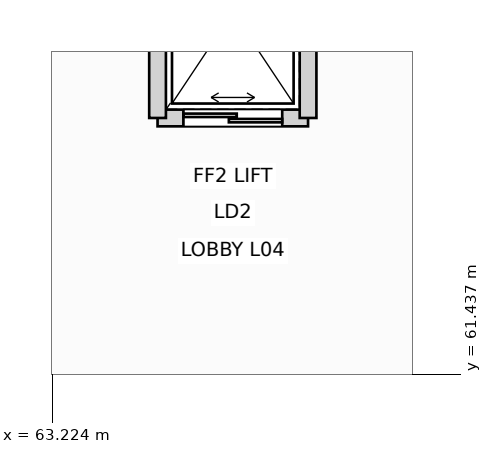
"""IFC4 building model, lengths in metres.
Left out: names, types, materials, properties, quantities, classifications, styles, units other than length and angle.
Written with IfcOpenShell. Run it as: python <this file> out.ifc"""

import sys

from ifc_helpers import new_model, si_unit, direction, frame, frame_2d, origin, place, context, subcontext, project, spatial, rectangle, extrude, element, fill, save


model = new_model("IFC4")
c1 = context("Model", 3, precision=1e-05, world=origin(), true_north=direction((0.0, 1.0)))
c2 = subcontext(c1, "Body", "Model", "MODEL_VIEW")
j1 = project(units=[si_unit("LENGTHUNIT", "METRE"), si_unit("PLANEANGLEUNIT", "RADIAN")], contexts=[c1])
p1 = place(None, origin())
s1 = spatial("IfcSite", under=j1, at=p1, CompositionType="ELEMENT")
p2 = place(p1, origin())
s2 = spatial("IfcBuilding", under=s1, at=p2, CompositionType="ELEMENT")
p3 = place(p2, frame((0.0, 0.0, 21.6)))
s3 = spatial("IfcBuildingStorey", under=s2, at=p3, CompositionType="ELEMENT", Elevation=21.6)
p4 = place(p3, frame((64.61, 64.81, 0.0), z_axis=(0.0, 0.0, 1.0), x_axis=(1.0, 0.0, 0.0)))
e1 = element("IfcWall", 1, at=p4, inside=s3, PredefinedType="PARTITIONING", context=c2, shape_type="SweptSolid", body=[
    extrude(rectangle(XDim=1.98, YDim=0.22, at=frame_2d((0.99, 0.0))), origin(), (0.0, 0.0, 1.0), 4.505),
])
p5 = place(p4, frame((0.34, 0.0, 0.0)))
e2 = element("IfcOpeningElement", 2, at=p5, cuts=e1, PredefinedType="OPENING", context=c2, shape_type="SweptSolid", body=[
    extrude(rectangle(XDim=1.3, YDim=2.2, at=frame_2d((0.65, 1.1))), frame((0.0, 0.12, 0.0), z_axis=(0.0, -1.0, 0.0), x_axis=(1.0, 0.0, 0.0)), (0.0, 0.0, 1.0), 0.24),
])
for number, where, z_axis, x_axis in (
    (3, (64.61, 64.81, 0.0), (0.0, 0.0, 1.0), (0.0, 1.0, 0.0)),
    (4, (66.59, 64.81, 0.0), (0.0, 0.0, 1.0), (0.0, 1.0, 0.0)),
):
    element("IfcWall", number, at=place(p3, frame(where, z_axis=z_axis, x_axis=x_axis)), inside=s3, PredefinedType="PARTITIONING", context=c2, shape_type="SweptSolid", body=[
        extrude(rectangle(XDim=2.78, YDim=0.22, at=frame_2d((1.39, 0.0))), origin(), (0.0, 0.0, 1.0), 4.235),
    ])
p6 = place(p5, origin())
e5 = element("IfcDoor", 5, at=p6, inside=s3, OperationType="DOUBLE_DOOR_SLIDING", PredefinedType="DOOR", context=c2, shape_type="SweptSolid", body=[
    extrude(rectangle(XDim=1.3, YDim=2.2, at=frame_2d((0.65, 1.1))), frame((0.0, 0.025, 0.0), z_axis=(0.0, -1.0, 0.0), x_axis=(1.0, 0.0, 0.0)), (0.0, 0.0, 1.0), 0.05),
])
fill(e2, e5)
save(model, sys.argv[1])
